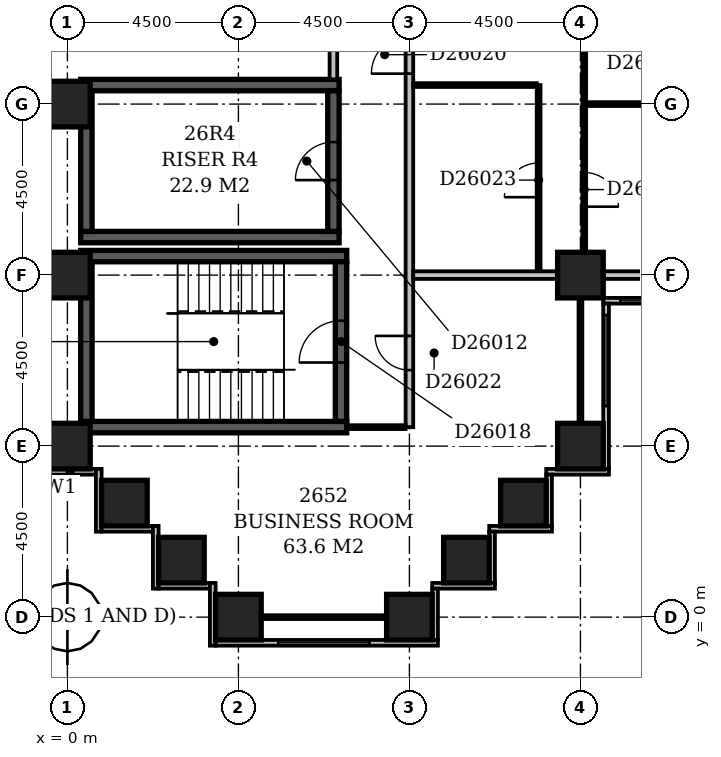
"""IFC4 building model, lengths in metres.
Left out: names, types, materials, properties, quantities, classifications, styles, units other than length and angle.
Written with IfcOpenShell. Run it as: python <this file> out.ifc"""

import sys

from ifc_helpers import new_model, si_unit, direction, frame, frame_2d, origin, origin_2d, place, context, subcontext, project, spatial, rectangle, extrude, element, fill, save


model = new_model("IFC4")
c1 = context("Model", 3, precision=1e-05, world=origin(), true_north=direction((0.0, 1.0)))
c2 = subcontext(c1, "Body", "Model", "MODEL_VIEW")
j1 = project(units=[si_unit("LENGTHUNIT", "METRE"), si_unit("PLANEANGLEUNIT", "RADIAN")], contexts=[c1])
p1 = place(None, origin())
s1 = spatial("IfcSite", under=j1, at=p1, CompositionType="ELEMENT")
p2 = place(p1, origin())
s2 = spatial("IfcBuilding", under=s1, at=p2, CompositionType="ELEMENT")
p3 = place(p2, frame((0.0, 0.0, 104.6)))
s3 = spatial("IfcBuildingStorey", under=s2, at=p3, CompositionType="ELEMENT", Elevation=104.6)
for number, where, z_axis, x_axis in (
    (1, (0.35, 5.0, -0.3), (0.0, 0.0, 1.0), (1.0, 0.0, 0.0)),
    (2, (0.35, 9.5, -0.3), (0.0, 0.0, 1.0), (1.0, 0.0, 0.0)),
):
    element("IfcWall", number, at=place(p3, frame(where, z_axis=z_axis, x_axis=x_axis)), inside=s3, PredefinedType="SHEAR", context=c2, shape_type="SweptSolid", body=[
        extrude(rectangle(XDim=7.0, YDim=0.3, at=frame_2d((3.5, 0.0))), origin(), (0.0, 0.0, 1.0), 3.45),
    ])
for number, where, z_axis, x_axis in (
    (3, (0.35, 10.0, -0.3), (0.0, 0.0, 1.0), (1.0, 0.0, 0.0)),
    (4, (0.35, 14.0, -0.3), (0.0, 0.0, 1.0), (1.0, 0.0, 0.0)),
):
    element("IfcWall", number, at=place(p3, frame(where, z_axis=z_axis, x_axis=x_axis)), inside=s3, PredefinedType="SHEAR", context=c2, shape_type="SweptSolid", body=[
        extrude(rectangle(XDim=6.8, YDim=0.3, at=frame_2d((3.4, 0.0))), origin(), (0.0, 0.0, 1.0), 3.45),
    ])
p4 = place(p3, frame((0.5, 5.15, -0.3), z_axis=(0.0, 0.0, 1.0), x_axis=(0.0, 1.0, 0.0)))
e5 = element("IfcWall", 5, at=p4, inside=s3, PredefinedType="SHEAR", context=c2, shape_type="SweptSolid", body=[
    extrude(rectangle(XDim=4.2, YDim=0.3, at=frame_2d((2.1, 0.0))), origin(), (0.0, 0.0, 1.0), 3.45),
])
p5 = place(p3, frame((0.5, 10.15, -0.3), z_axis=(0.0, 0.0, 1.0), x_axis=(0.0, 1.0, 0.0)))
e6 = element("IfcWall", 6, at=p5, inside=s3, PredefinedType="SHEAR", context=c2, shape_type="SweptSolid", body=[
    extrude(rectangle(XDim=3.7, YDim=0.3, at=frame_2d((1.85, 0.0))), origin(), (0.0, 0.0, 1.0), 3.45),
])
p6 = place(p3, frame((7.0, 10.15, -0.3), z_axis=(0.0, 0.0, 1.0), x_axis=(0.0, 1.0, 0.0)))
e7 = element("IfcWall", 7, at=p6, inside=s3, PredefinedType="SHEAR", context=c2, shape_type="SweptSolid", body=[
    extrude(rectangle(XDim=3.7, YDim=0.3, at=frame_2d((1.85, 0.0))), origin(), (0.0, 0.0, 1.0), 3.45),
])
p7 = place(p6, frame((1.35, 0.0, 0.3)))
e8 = element("IfcOpeningElement", 8, at=p7, cuts=e7, PredefinedType="OPENING", context=c2, shape_type="SweptSolid", body=[
    extrude(rectangle(XDim=1.0, YDim=2.1, at=frame_2d((0.5, 1.05))), frame((0.0, 0.162, 0.0), z_axis=(0.0, -1.0, 0.0), x_axis=(1.0, 0.0, 0.0)), (0.0, 0.0, 1.0), 0.324),
])
p8 = place(p3, frame((7.2, 5.15, -0.3), z_axis=(0.0, 0.0, 1.0), x_axis=(0.0, 1.0, 0.0)))
e9 = element("IfcWall", 9, at=p8, inside=s3, PredefinedType="SHEAR", context=c2, shape_type="SweptSolid", body=[
    extrude(rectangle(XDim=4.2, YDim=0.3, at=frame_2d((2.1, 0.0))), origin(), (0.0, 0.0, 1.0), 3.45),
])
p9 = place(p8, frame((1.55, 0.0, 0.3)))
e10 = element("IfcOpeningElement", 10, at=p9, cuts=e9, PredefinedType="OPENING", context=c2, shape_type="SweptSolid", body=[
    extrude(rectangle(XDim=1.1, YDim=2.1, at=frame_2d((0.55, 1.05))), frame((0.0, 0.162, 0.0), z_axis=(0.0, -1.0, 0.0), x_axis=(1.0, 0.0, 0.0)), (0.0, 0.0, 1.0), 0.324),
])
for number, where, z_axis, x_axis in (
    (11, (4.5, 0.0, -0.3), (0.0, 0.0, 1.0), (1.0, 0.0, 0.0)),
    (12, (9.0, 0.0, -0.3), (0.0, 0.0, 1.0), (1.0, 0.0, 0.0)),
    (13, (3.0, 1.5, -0.3), (0.0, 0.0, 1.0), (1.0, 0.0, 0.0)),
    (14, (10.5, 1.5, -0.3), (0.0, 0.0, 1.0), (1.0, 0.0, 0.0)),
    (15, (1.5, 3.0, -0.3), (0.0, 0.0, 1.0), (1.0, 0.0, 0.0)),
    (16, (12.0, 3.0, -0.3), (0.0, 0.0, 1.0), (1.0, 0.0, 0.0)),
    (17, (0.0, 4.5, -0.3), (0.0, 0.0, 1.0), (1.0, 0.0, 0.0)),
    (18, (13.5, 4.5, -0.3), (0.0, 0.0, 1.0), (1.0, 0.0, 0.0)),
    (19, (0.0, 9.0, -0.3), (0.0, 0.0, 1.0), (1.0, 0.0, 0.0)),
    (20, (13.5, 9.0, -0.3), (0.0, 0.0, 1.0), (1.0, 0.0, 0.0)),
    (21, (0.0, 13.5, -0.3), (0.0, 0.0, 1.0), (1.0, 0.0, 0.0)),
):
    element("IfcColumn", number, at=place(p3, frame(where, z_axis=z_axis, x_axis=x_axis)), inside=s3, PredefinedType="COLUMN", context=c2, shape_type="SweptSolid", body=[
        extrude(rectangle(XDim=1.2, YDim=1.2, at=origin_2d()), origin(), (0.0, 0.0, 1.0), 3.45),
    ])
p10 = place(p3, frame((9.675, -0.6, 0.0), z_axis=(0.0, 0.0, 1.0), x_axis=(0.0, 1.0, 0.0)))
e22 = element("IfcWall", 22, at=p10, inside=s3, PredefinedType="STANDARD", context=c2, shape_type="SweptSolid", body=[
    extrude(rectangle(XDim=1.35, YDim=0.15, at=frame_2d((0.675, 0.0))), origin(), (0.0, 0.0, 1.0), 2.5),
])
p11 = place(p3, frame((9.6, 0.825, 0.0), z_axis=(0.0, 0.0, 1.0), x_axis=(1.0, 0.0, 0.0)))
e23 = element("IfcWall", 23, at=p11, inside=s3, PredefinedType="STANDARD", context=c2, shape_type="SweptSolid", body=[
    extrude(rectangle(XDim=1.65, YDim=0.15, at=frame_2d((0.825, 0.0))), origin(), (0.0, 0.0, 1.0), 2.5),
])
p12 = place(p3, frame((11.175, 0.9, 0.0), z_axis=(0.0, 0.0, 1.0), x_axis=(0.0, 1.0, 0.0)))
e24 = element("IfcWall", 24, at=p12, inside=s3, PredefinedType="STANDARD", context=c2, shape_type="SweptSolid", body=[
    extrude(rectangle(XDim=1.35, YDim=0.15, at=frame_2d((0.675, 0.0))), origin(), (0.0, 0.0, 1.0), 2.5),
])
p13 = place(p3, frame((11.1, 2.325, 0.0), z_axis=(0.0, 0.0, 1.0), x_axis=(1.0, 0.0, 0.0)))
e25 = element("IfcWall", 25, at=p13, inside=s3, PredefinedType="STANDARD", context=c2, shape_type="SweptSolid", body=[
    extrude(rectangle(XDim=1.65, YDim=0.15, at=frame_2d((0.825, 0.0))), origin(), (0.0, 0.0, 1.0), 2.5),
])
p14 = place(p3, frame((12.675, 2.4, 0.0), z_axis=(0.0, 0.0, 1.0), x_axis=(0.0, 1.0, 0.0)))
e26 = element("IfcWall", 26, at=p14, inside=s3, PredefinedType="STANDARD", context=c2, shape_type="SweptSolid", body=[
    extrude(rectangle(XDim=1.35, YDim=0.15, at=frame_2d((0.675, 0.0))), origin(), (0.0, 0.0, 1.0), 2.5),
])
p15 = place(p3, frame((12.6, 3.825, 0.0), z_axis=(0.0, 0.0, 1.0), x_axis=(1.0, 0.0, 0.0)))
e27 = element("IfcWall", 27, at=p15, inside=s3, PredefinedType="STANDARD", context=c2, shape_type="SweptSolid", body=[
    extrude(rectangle(XDim=1.65, YDim=0.15, at=frame_2d((0.825, 0.0))), origin(), (0.0, 0.0, 1.0), 2.5),
])
p16 = place(p3, frame((14.175, 3.9, 0.0), z_axis=(0.0, 0.0, 1.0), x_axis=(0.0, 1.0, 0.0)))
e28 = element("IfcWall", 28, at=p16, inside=s3, PredefinedType="STANDARD", context=c2, shape_type="SweptSolid", body=[
    extrude(rectangle(XDim=4.35, YDim=0.15, at=frame_2d((2.175, 0.0))), origin(), (0.0, 0.0, 1.0), 2.5),
])
p17 = place(p16, frame((1.65, 0.0, 0.6)))
e29 = element("IfcOpeningElement", 29, at=p17, cuts=e28, PredefinedType="OPENING", context=c2, shape_type="SweptSolid", body=[
    extrude(rectangle(XDim=2.4, YDim=1.8, at=frame_2d((1.2, 0.9))), frame((0.0, 0.087, 0.0), z_axis=(0.0, -1.0, 0.0), x_axis=(1.0, 0.0, 0.0)), (0.0, 0.0, 1.0), 0.174),
])
p18 = place(p3, frame((14.1, 8.325, 0.0), z_axis=(0.0, 0.0, 1.0), x_axis=(1.0, 0.0, 0.0)))
e30 = element("IfcWall", 30, at=p18, inside=s3, PredefinedType="STANDARD", context=c2, shape_type="SweptSolid", body=[
    extrude(rectangle(XDim=4.65, YDim=0.15, at=frame_2d((2.325, 0.0))), origin(), (0.0, 0.0, 1.0), 2.5),
])
p19 = place(p18, frame((0.45, 0.0, 0.6)))
e31 = element("IfcOpeningElement", 31, at=p19, cuts=e30, PredefinedType="OPENING", context=c2, shape_type="SweptSolid", body=[
    extrude(rectangle(XDim=2.4, YDim=1.8, at=frame_2d((1.2, 0.9))), frame((0.0, 0.087, 0.0), z_axis=(0.0, -1.0, 0.0), x_axis=(1.0, 0.0, 0.0)), (0.0, 0.0, 1.0), 0.174),
])
p20 = place(p3, frame((-0.6, 3.825, 0.0), z_axis=(0.0, 0.0, 1.0), x_axis=(1.0, 0.0, 0.0)))
e32 = element("IfcWall", 32, at=p20, inside=s3, PredefinedType="STANDARD", context=c2, shape_type="SweptSolid", body=[
    extrude(rectangle(XDim=1.35, YDim=0.15, at=frame_2d((0.675, 0.0))), origin(), (0.0, 0.0, 1.0), 2.5),
])
p21 = place(p3, frame((0.825, 3.9, 0.0), z_axis=(0.0, 0.0, 1.0), x_axis=(0.0, -1.0, 0.0)))
e33 = element("IfcWall", 33, at=p21, inside=s3, PredefinedType="STANDARD", context=c2, shape_type="SweptSolid", body=[
    extrude(rectangle(XDim=1.65, YDim=0.15, at=frame_2d((0.825, 0.0))), origin(), (0.0, 0.0, 1.0), 2.5),
])
p22 = place(p3, frame((0.9, 2.325, 0.0), z_axis=(0.0, 0.0, 1.0), x_axis=(1.0, 0.0, 0.0)))
e34 = element("IfcWall", 34, at=p22, inside=s3, PredefinedType="STANDARD", context=c2, shape_type="SweptSolid", body=[
    extrude(rectangle(XDim=1.35, YDim=0.15, at=frame_2d((0.675, 0.0))), origin(), (0.0, 0.0, 1.0), 2.5),
])
p23 = place(p3, frame((2.325, 2.4, 0.0), z_axis=(0.0, 0.0, 1.0), x_axis=(0.0, -1.0, 0.0)))
e35 = element("IfcWall", 35, at=p23, inside=s3, PredefinedType="STANDARD", context=c2, shape_type="SweptSolid", body=[
    extrude(rectangle(XDim=1.65, YDim=0.15, at=frame_2d((0.825, 0.0))), origin(), (0.0, 0.0, 1.0), 2.5),
])
p24 = place(p3, frame((2.4, 0.825, 0.0), z_axis=(0.0, 0.0, 1.0), x_axis=(1.0, 0.0, 0.0)))
e36 = element("IfcWall", 36, at=p24, inside=s3, PredefinedType="STANDARD", context=c2, shape_type="SweptSolid", body=[
    extrude(rectangle(XDim=1.35, YDim=0.15, at=frame_2d((0.675, 0.0))), origin(), (0.0, 0.0, 1.0), 2.5),
])
p25 = place(p3, frame((3.825, 0.9, 0.0), z_axis=(0.0, 0.0, 1.0), x_axis=(0.0, -1.0, 0.0)))
e37 = element("IfcWall", 37, at=p25, inside=s3, PredefinedType="STANDARD", context=c2, shape_type="SweptSolid", body=[
    extrude(rectangle(XDim=1.65, YDim=0.15, at=frame_2d((0.825, 0.0))), origin(), (0.0, 0.0, 1.0), 2.5),
])
p26 = place(p3, frame((3.9, -0.675, 0.0), z_axis=(0.0, 0.0, 1.0), x_axis=(1.0, 0.0, 0.0)))
e38 = element("IfcWall", 38, at=p26, inside=s3, PredefinedType="STANDARD", context=c2, shape_type="SweptSolid", body=[
    extrude(rectangle(XDim=5.85, YDim=0.15, at=frame_2d((2.925, 0.0))), origin(), (0.0, 0.0, 1.0), 2.5),
])
p27 = place(p26, frame((1.65, 0.0, 0.6)))
e39 = element("IfcOpeningElement", 39, at=p27, cuts=e38, PredefinedType="OPENING", context=c2, shape_type="SweptSolid", body=[
    extrude(rectangle(XDim=2.4, YDim=1.8, at=frame_2d((1.2, 0.9))), frame((0.0, 0.087, 0.0), z_axis=(0.0, -1.0, 0.0), x_axis=(1.0, 0.0, 0.0)), (0.0, 0.0, 1.0), 0.174),
])
p28 = place(p3, frame((5.1, 0.0, 0.0), z_axis=(0.0, 0.0, 1.0), x_axis=(1.0, 0.0, 0.0)))
e40 = element("IfcWall", 40, at=p28, inside=s3, PredefinedType="PARTITIONING", context=c2, shape_type="SweptSolid", body=[
    extrude(rectangle(XDim=3.3, YDim=0.1, at=frame_2d((1.65, 0.0))), origin(), (0.0, 0.0, 1.0), 2.5),
])
p29 = place(p3, frame((0.0, 4.4, 0.0), z_axis=(0.0, 0.0, 1.0), x_axis=(0.0, 1.0, 0.0)))
e41 = element("IfcWall", 41, at=p29, inside=s3, PredefinedType="PARTITIONING", context=c2, shape_type="SweptSolid", body=[
    extrude(rectangle(XDim=0.7, YDim=0.1, at=frame_2d((0.35, 0.0))), origin(), (0.0, 0.0, 1.0), 2.5),
])
p30 = place(p3, frame((7.349, 5.0, 0.0), z_axis=(0.0, 0.0, 1.0), x_axis=(1.0, 0.0, 0.0)))
e42 = element("IfcWall", 42, at=p30, inside=s3, PredefinedType="PARTITIONING", context=c2, shape_type="SweptSolid", body=[
    extrude(rectangle(XDim=1.551, YDim=0.1, at=frame_2d((0.775, 0.0))), origin(), (0.0, 0.0, 1.0), 3.15),
])
p31 = place(p3, frame((9.0, 5.0, 0.0), z_axis=(0.0, 0.0, 1.0), x_axis=(0.0, 1.0, 0.0)))
e43 = element("IfcWall", 43, at=p31, inside=s3, PredefinedType="PARTITIONING", context=c2, shape_type="SweptSolid", body=[
    extrude(rectangle(XDim=44.5, YDim=0.2, at=frame_2d((22.25, 0.0))), origin(), (0.0, 0.0, 1.0), 3.15),
])
p32 = place(p31, frame((18.4, 0.0, 0.0)))
e44 = element("IfcOpeningElement", 44, at=p32, cuts=e43, PredefinedType="OPENING", context=c2, shape_type="SweptSolid", body=[
    extrude(rectangle(XDim=1.0, YDim=2.1, at=frame_2d((0.5, 1.05))), frame((0.0, 0.112, 0.0), z_axis=(0.0, -1.0, 0.0), x_axis=(1.0, 0.0, 0.0)), (0.0, 0.0, 1.0), 0.224),
])
p33 = place(p31, frame((9.3, 0.0, 0.0)))
e45 = element("IfcOpeningElement", 45, at=p33, cuts=e43, PredefinedType="OPENING", context=c2, shape_type="SweptSolid", body=[
    extrude(rectangle(XDim=1.0, YDim=2.1, at=frame_2d((0.5, 1.05))), frame((0.0, 0.112, 0.0), z_axis=(0.0, -1.0, 0.0), x_axis=(1.0, 0.0, 0.0)), (0.0, 0.0, 1.0), 0.224),
])
p34 = place(p31, frame((37.25, 0.0, 0.0)))
e46 = element("IfcOpeningElement", 46, at=p34, cuts=e43, PredefinedType="OPENING", context=c2, shape_type="SweptSolid", body=[
    extrude(rectangle(XDim=0.9, YDim=2.1, at=frame_2d((0.45, 1.05))), frame((0.0, 0.112, 0.0), z_axis=(0.0, -1.0, 0.0), x_axis=(1.0, 0.0, 0.0)), (0.0, 0.0, 1.0), 0.224),
])
p35 = place(p31, frame((1.5, 0.0, 0.0)))
e47 = element("IfcOpeningElement", 47, at=p35, cuts=e43, PredefinedType="OPENING", context=c2, shape_type="SweptSolid", body=[
    extrude(rectangle(XDim=0.9, YDim=2.1, at=frame_2d((0.45, 1.05))), frame((0.0, 0.112, 0.0), z_axis=(0.0, -1.0, 0.0), x_axis=(1.0, 0.0, 0.0)), (0.0, 0.0, 1.0), 0.224),
])
p36 = place(p3, frame((13.5, 5.1, 0.0), z_axis=(0.0, 0.0, 1.0), x_axis=(0.0, 1.0, 0.0)))
e48 = element("IfcWall", 48, at=p36, inside=s3, PredefinedType="PARTITIONING", context=c2, shape_type="SweptSolid", body=[
    extrude(rectangle(XDim=3.3, YDim=0.1, at=frame_2d((1.65, 0.0))), origin(), (0.0, 0.0, 1.0), 2.5),
])
p37 = place(p3, frame((9.1, 9.0, 0.0), z_axis=(0.0, 0.0, 1.0), x_axis=(1.0, 0.0, 0.0)))
e49 = element("IfcWall", 49, at=p37, inside=s3, PredefinedType="PARTITIONING", context=c2, shape_type="SweptSolid", body=[
    extrude(rectangle(XDim=3.8, YDim=0.2, at=frame_2d((1.9, 0.0))), origin(), (0.0, 0.0, 1.0), 3.15),
])
p38 = place(p3, frame((14.1, 9.0, 0.0), z_axis=(0.0, 0.0, 1.0), x_axis=(1.0, 0.0, 0.0)))
e50 = element("IfcWall", 50, at=p38, inside=s3, PredefinedType="PARTITIONING", context=c2, shape_type="SweptSolid", body=[
    extrude(rectangle(XDim=3.3, YDim=0.2, at=frame_2d((1.65, 0.0))), origin(), (0.0, 0.0, 1.0), 2.5),
])
p39 = place(p3, frame((12.4, 9.1, 0.0), z_axis=(0.0, 0.0, 1.0), x_axis=(0.0, 1.0, 0.0)))
e51 = element("IfcWall", 51, at=p39, inside=s3, PredefinedType="PARTITIONING", context=c2, shape_type="SweptSolid", body=[
    extrude(rectangle(XDim=4.9, YDim=0.1, at=frame_2d((2.45, 0.0))), origin(), (0.0, 0.0, 1.0), 3.15),
])
p40 = place(p39, frame((1.95, 0.0, 0.0)))
e52 = element("IfcOpeningElement", 52, at=p40, cuts=e51, PredefinedType="OPENING", context=c2, shape_type="SweptSolid", body=[
    extrude(rectangle(XDim=0.9, YDim=2.1, at=frame_2d((0.45, 1.05))), frame((0.0, 0.062, 0.0), z_axis=(0.0, -1.0, 0.0), x_axis=(1.0, 0.0, 0.0)), (0.0, 0.0, 1.0), 0.124),
])
p41 = place(p3, frame((13.6, 9.6, 0.0), z_axis=(0.0, 0.0, 1.0), x_axis=(0.0, 1.0, 0.0)))
e53 = element("IfcWall", 53, at=p41, inside=s3, PredefinedType="PARTITIONING", context=c2, shape_type="SweptSolid", body=[
    extrude(rectangle(XDim=8.3, YDim=0.1, at=frame_2d((4.15, 0.0))), origin(), (0.0, 0.0, 1.0), 3.15),
])
p42 = place(p41, frame((1.2, 0.0, 0.0)))
e54 = element("IfcOpeningElement", 54, at=p42, cuts=e53, PredefinedType="OPENING", context=c2, shape_type="SweptSolid", body=[
    extrude(rectangle(XDim=0.9, YDim=2.1, at=frame_2d((0.45, 1.05))), frame((0.0, 0.062, 0.0), z_axis=(0.0, -1.0, 0.0), x_axis=(1.0, 0.0, 0.0)), (0.0, 0.0, 1.0), 0.124),
])
p43 = place(p41, frame((5.7, 0.0, 0.0)))
e55 = element("IfcOpeningElement", 55, at=p43, cuts=e53, PredefinedType="OPENING", context=c2, shape_type="SweptSolid", body=[
    extrude(rectangle(XDim=0.9, YDim=2.1, at=frame_2d((0.45, 1.05))), frame((0.0, 0.062, 0.0), z_axis=(0.0, -1.0, 0.0), x_axis=(1.0, 0.0, 0.0)), (0.0, 0.0, 1.0), 0.124),
])
p44 = place(p3, frame((13.65, 13.5, 0.0), z_axis=(0.0, 0.0, 1.0), x_axis=(1.0, 0.0, 0.0)))
e56 = element("IfcWall", 56, at=p44, inside=s3, PredefinedType="PARTITIONING", context=c2, shape_type="SweptSolid", body=[
    extrude(rectangle(XDim=3.75, YDim=0.1, at=frame_2d((1.875, 0.0))), origin(), (0.0, 0.0, 1.0), 3.15),
])
p45 = place(p3, frame((9.1, 14.0, 0.0), z_axis=(0.0, 0.0, 1.0), x_axis=(1.0, 0.0, 0.0)))
e57 = element("IfcWall", 57, at=p45, inside=s3, PredefinedType="PARTITIONING", context=c2, shape_type="SweptSolid", body=[
    extrude(rectangle(XDim=3.25, YDim=0.1, at=frame_2d((1.625, 0.0))), origin(), (0.0, 0.0, 1.0), 3.15),
])
p46 = place(p3, frame((7.0, 14.15, 0.0), z_axis=(0.0, 0.0, 1.0), x_axis=(0.0, 1.0, 0.0)))
e58 = element("IfcWall", 58, at=p46, inside=s3, PredefinedType="PARTITIONING", context=c2, shape_type="SweptSolid", body=[
    extrude(rectangle(XDim=4.2, YDim=0.2, at=frame_2d((2.1, 0.0))), origin(), (0.0, 0.0, 1.0), 3.15),
])
p47 = place(p46, frame((1.6, 0.0, 0.0)))
e59 = element("IfcOpeningElement", 59, at=p47, cuts=e58, PredefinedType="OPENING", context=c2, shape_type="SweptSolid", body=[
    extrude(rectangle(XDim=1.0, YDim=2.1, at=frame_2d((0.5, 1.05))), frame((0.0, 0.112, 0.0), z_axis=(0.0, -1.0, 0.0), x_axis=(1.0, 0.0, 0.0)), (0.0, 0.0, 1.0), 0.224),
])
p48 = place(p17, origin())
e60 = element("IfcWindow", 60, at=p48, inside=s3, PartitioningType="SINGLE_PANEL", PredefinedType="WINDOW", context=c2, shape_type="SweptSolid", body=[
    extrude(rectangle(XDim=2.4, YDim=1.8, at=frame_2d((1.2, 0.9))), frame((0.0, 0.03, 0.0), z_axis=(0.0, -1.0, 0.0), x_axis=(1.0, 0.0, 0.0)), (0.0, 0.0, 1.0), 0.06),
])
fill(e29, e60)
p49 = place(p19, origin())
e61 = element("IfcWindow", 61, at=p49, inside=s3, PartitioningType="SINGLE_PANEL", PredefinedType="WINDOW", context=c2, shape_type="SweptSolid", body=[
    extrude(rectangle(XDim=2.4, YDim=1.8, at=frame_2d((1.2, 0.9))), frame((0.0, 0.03, 0.0), z_axis=(0.0, -1.0, 0.0), x_axis=(1.0, 0.0, 0.0)), (0.0, 0.0, 1.0), 0.06),
])
fill(e31, e61)
p50 = place(p27, origin())
e62 = element("IfcWindow", 62, at=p50, inside=s3, PartitioningType="SINGLE_PANEL", PredefinedType="WINDOW", context=c2, shape_type="SweptSolid", body=[
    extrude(rectangle(XDim=2.4, YDim=1.8, at=frame_2d((1.2, 0.9))), frame((0.0, 0.03, 0.0), z_axis=(0.0, -1.0, 0.0), x_axis=(1.0, 0.0, 0.0)), (0.0, 0.0, 1.0), 0.06),
])
fill(e39, e62)
p51 = place(p7, origin())
e63 = element("IfcDoor", 63, at=p51, inside=s3, OperationType="SINGLE_SWING_LEFT", PredefinedType="DOOR", context=c2, shape_type="SweptSolid", body=[
    extrude(rectangle(XDim=1.0, YDim=2.1, at=frame_2d((0.5, 1.05))), frame((0.0, 0.025, 0.0), z_axis=(0.0, -1.0, 0.0), x_axis=(1.0, 0.0, 0.0)), (0.0, 0.0, 1.0), 0.05),
])
fill(e8, e63)
p52 = place(p9, origin())
e64 = element("IfcDoor", 64, at=p52, inside=s3, OperationType="SINGLE_SWING_LEFT", PredefinedType="DOOR", context=c2, shape_type="SweptSolid", body=[
    extrude(rectangle(XDim=1.1, YDim=2.1, at=frame_2d((0.55, 1.05))), frame((0.0, 0.025, 0.0), z_axis=(0.0, -1.0, 0.0), x_axis=(1.0, 0.0, 0.0)), (0.0, 0.0, 1.0), 0.05),
])
fill(e10, e64)
p53 = place(p33, origin())
e65 = element("IfcDoor", 65, at=p53, inside=s3, OperationType="SINGLE_SWING_LEFT", PredefinedType="DOOR", context=c2, shape_type="SweptSolid", body=[
    extrude(rectangle(XDim=1.0, YDim=2.1, at=frame_2d((0.5, 1.05))), frame((0.0, 0.025, 0.0), z_axis=(0.0, -1.0, 0.0), x_axis=(1.0, 0.0, 0.0)), (0.0, 0.0, 1.0), 0.05),
])
fill(e45, e65)
p54 = place(p35, frame((0.9, 0.0, 0.0), z_axis=(0.0, 0.0, 1.0), x_axis=(-1.0, 0.0, 0.0)))
e66 = element("IfcDoor", 66, at=p54, inside=s3, OperationType="SINGLE_SWING_LEFT", PredefinedType="DOOR", context=c2, shape_type="SweptSolid", body=[
    extrude(rectangle(XDim=0.9, YDim=2.1, at=frame_2d((0.45, 1.05))), frame((0.0, 0.025, 0.0), z_axis=(0.0, -1.0, 0.0), x_axis=(1.0, 0.0, 0.0)), (0.0, 0.0, 1.0), 0.05),
])
fill(e47, e66)
p55 = place(p40, origin())
e67 = element("IfcDoor", 67, at=p55, inside=s3, OperationType="SINGLE_SWING_LEFT", PredefinedType="DOOR", context=c2, shape_type="SweptSolid", body=[
    extrude(rectangle(XDim=0.9, YDim=2.1, at=frame_2d((0.45, 1.05))), frame((0.0, 0.025, 0.0), z_axis=(0.0, -1.0, 0.0), x_axis=(1.0, 0.0, 0.0)), (0.0, 0.0, 1.0), 0.05),
])
fill(e52, e67)
p56 = place(p42, frame((0.9, 0.0, 0.0), z_axis=(0.0, 0.0, 1.0), x_axis=(-1.0, 0.0, 0.0)))
e68 = element("IfcDoor", 68, at=p56, inside=s3, OperationType="SINGLE_SWING_RIGHT", PredefinedType="DOOR", context=c2, shape_type="SweptSolid", body=[
    extrude(rectangle(XDim=0.9, YDim=2.1, at=frame_2d((0.45, 1.05))), frame((0.0, 0.025, 0.0), z_axis=(0.0, -1.0, 0.0), x_axis=(1.0, 0.0, 0.0)), (0.0, 0.0, 1.0), 0.05),
])
fill(e54, e68)
save(model, sys.argv[1])
